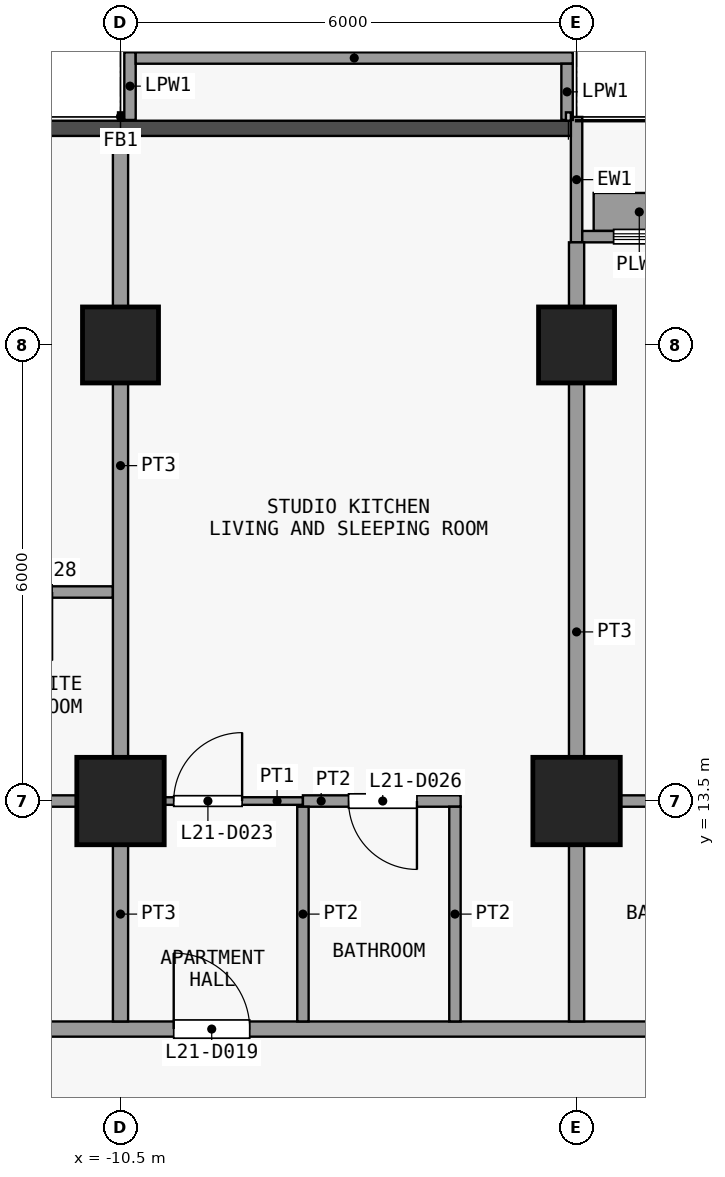
"""IFC4 building model, lengths in metres.
Left out: names, types, materials, properties, quantities, classifications, styles, units other than length and angle.
Written with IfcOpenShell. Run it as: python <this file> out.ifc"""

import sys

from ifc_helpers import new_model, si_unit, direction, frame, frame_2d, origin, origin_2d, place, context, subcontext, project, spatial, rectangle, extrude, element, fill, save


model = new_model("IFC4")
c1 = context("Model", 3, precision=1e-05, world=origin(), true_north=direction((0.0, 1.0)))
c2 = subcontext(c1, "Body", "Model", "MODEL_VIEW")
j1 = project(units=[si_unit("LENGTHUNIT", "METRE"), si_unit("PLANEANGLEUNIT", "RADIAN")], contexts=[c1])
p1 = place(None, origin())
s1 = spatial("IfcSite", under=j1, at=p1, CompositionType="ELEMENT")
p2 = place(p1, origin())
s2 = spatial("IfcBuilding", under=s1, at=p2, CompositionType="ELEMENT")
p3 = place(p2, frame((0.0, 0.0, 88.3)))
s3 = spatial("IfcBuildingStorey", under=s2, at=p3, CompositionType="ELEMENT", Elevation=88.3)
p4 = place(p3, frame((-10.5, 13.5, 0.0), z_axis=(0.0, 0.0, 1.0), x_axis=(1.0, 0.0, 0.0)))
e1 = element("IfcColumn", 1, at=p4, inside=s3, PredefinedType="COLUMN", context=c2, shape_type="SweptSolid", body=[
    extrude(rectangle(XDim=1.15, YDim=1.15, at=origin_2d()), origin(), (0.0, 0.0, 1.0), 3.6),
])
p5 = place(p3, frame((-10.5, 19.5, 0.0), z_axis=(0.0, 0.0, 1.0), x_axis=(1.0, 0.0, 0.0)))
e2 = element("IfcColumn", 2, at=p5, inside=s3, PredefinedType="COLUMN", context=c2, shape_type="SweptSolid", body=[
    extrude(rectangle(XDim=1.0, YDim=1.0, at=origin_2d()), origin(), (0.0, 0.0, 1.0), 3.6),
])
p6 = place(p3, frame((-4.5, 13.5, 0.0), z_axis=(0.0, 0.0, 1.0), x_axis=(1.0, 0.0, 0.0)))
e3 = element("IfcColumn", 3, at=p6, inside=s3, PredefinedType="COLUMN", context=c2, shape_type="SweptSolid", body=[
    extrude(rectangle(XDim=1.15, YDim=1.15, at=origin_2d()), origin(), (0.0, 0.0, 1.0), 3.6),
])
p7 = place(p3, frame((-4.5, 19.5, 0.0), z_axis=(0.0, 0.0, 1.0), x_axis=(1.0, 0.0, 0.0)))
e4 = element("IfcColumn", 4, at=p7, inside=s3, PredefinedType="COLUMN", context=c2, shape_type="SweptSolid", body=[
    extrude(rectangle(XDim=1.0, YDim=1.0, at=origin_2d()), origin(), (0.0, 0.0, 1.0), 3.6),
])
p8 = place(p3, frame((-4.5, 20.85, 0.0), z_axis=(0.0, 0.0, 1.0), x_axis=(0.0, 1.0, 0.0)))
e5 = element("IfcWall", 5, at=p8, inside=s3, PredefinedType="SOLIDWALL", context=c2, shape_type="SweptSolid", body=[
    extrude(rectangle(XDim=1.65, YDim=0.15, at=frame_2d((0.825, 0.0))), origin(), (0.0, 0.0, 1.0), 3.3),
])
p9 = place(p3, frame((-4.425, 20.925, 0.0), z_axis=(0.0, 0.0, 1.0), x_axis=(1.0, 0.0, 0.0)))
e6 = element("IfcWall", 6, at=p9, inside=s3, PredefinedType="SOLIDWALL", context=c2, shape_type="SweptSolid", body=[
    extrude(rectangle(XDim=8.85, YDim=0.15, at=frame_2d((4.425, 0.0))), origin(), (0.0, 0.0, 1.0), 3.3),
])
p10 = place(p9, frame((3.825, 0.0, 0.0)))
e7 = element("IfcOpeningElement", 7, at=p10, cuts=e6, PredefinedType="OPENING", context=c2, shape_type="SweptSolid", body=[
    extrude(rectangle(XDim=1.2, YDim=2.4, at=frame_2d((0.6, 1.2))), frame((0.0, 0.085, 0.0), z_axis=(0.0, -1.0, 0.0), x_axis=(1.0, 0.0, 0.0)), (0.0, 0.0, 1.0), 0.17),
])
p11 = place(p9, frame((0.413, 0.0, 0.9)))
e8 = element("IfcOpeningElement", 8, at=p11, cuts=e6, PredefinedType="OPENING", context=c2, shape_type="SweptSolid", body=[
    extrude(rectangle(XDim=3.0, YDim=2.1, at=frame_2d((1.5, 1.05))), frame((0.0, 0.085, 0.0), z_axis=(0.0, -1.0, 0.0), x_axis=(1.0, 0.0, 0.0)), (0.0, 0.0, 1.0), 0.17),
])
p12 = place(p9, frame((5.438, 0.0, 0.9)))
e9 = element("IfcOpeningElement", 9, at=p12, cuts=e6, PredefinedType="OPENING", context=c2, shape_type="SweptSolid", body=[
    extrude(rectangle(XDim=3.0, YDim=2.1, at=frame_2d((1.5, 1.05))), frame((0.0, 0.085, 0.0), z_axis=(0.0, -1.0, 0.0), x_axis=(1.0, 0.0, 0.0)), (0.0, 0.0, 1.0), 0.17),
])
p13 = place(p3, frame((-4.275, 21.25, 0.0), z_axis=(0.0, 0.0, 1.0), x_axis=(1.0, 0.0, 0.0)))
e10 = element("IfcWall", 10, at=p13, inside=s3, PredefinedType="USERDEFINED", context=c2, shape_type="SweptSolid", body=[
    extrude(rectangle(XDim=1.2, YDim=0.5, at=frame_2d((0.6, 0.0))), origin(), (0.0, 0.0, 1.0), 0.9),
])
p14 = place(p3, frame((-10.375, 22.46, 0.0), z_axis=(0.0, 0.0, 1.0), x_axis=(0.0, 1.0, 0.0)))
e11 = element("IfcWall", 11, at=p14, inside=s3, PredefinedType="PARAPET", context=c2, shape_type="SweptSolid", body=[
    extrude(rectangle(XDim=0.89, YDim=0.15, at=frame_2d((0.445, 0.0))), origin(), (0.0, 0.0, 1.0), 1.15),
])
p15 = place(p3, frame((-10.3, 23.275, 0.0), z_axis=(0.0, 0.0, 1.0), x_axis=(1.0, 0.0, 0.0)))
e12 = element("IfcWall", 12, at=p15, inside=s3, PredefinedType="PARAPET", context=c2, shape_type="SweptSolid", body=[
    extrude(rectangle(XDim=5.75, YDim=0.15, at=frame_2d((2.875, 0.0))), origin(), (0.0, 0.0, 1.0), 1.15),
])
p16 = place(p3, frame((-4.625, 23.2, 0.0), z_axis=(0.0, 0.0, 1.0), x_axis=(0.0, -1.0, 0.0)))
e13 = element("IfcWall", 13, at=p16, inside=s3, PredefinedType="PARAPET", context=c2, shape_type="SweptSolid", body=[
    extrude(rectangle(XDim=0.74, YDim=0.15, at=frame_2d((0.37, 0.0))), origin(), (0.0, 0.0, 1.0), 1.15),
])
p17 = place(p3, frame((-25.35, 10.5, 0.0), z_axis=(0.0, 0.0, 1.0), x_axis=(1.0, 0.0, 0.0)))
e14 = element("IfcWall", 14, at=p17, inside=s3, PredefinedType="PARTITIONING", context=c2, shape_type="SweptSolid", body=[
    extrude(rectangle(XDim=49.2, YDim=0.2, at=frame_2d((24.6, 0.0))), origin(), (0.0, 0.0, 1.0), 3.3),
])
p18 = place(p17, frame((7.05, 0.0, 0.0)))
e15 = element("IfcOpeningElement", 15, at=p18, cuts=e14, PredefinedType="OPENING", context=c2, shape_type="SweptSolid", body=[
    extrude(rectangle(XDim=1.0, YDim=2.1, at=frame_2d((0.5, 1.05))), frame((0.0, 0.11, 0.0), z_axis=(0.0, -1.0, 0.0), x_axis=(1.0, 0.0, 0.0)), (0.0, 0.0, 1.0), 0.22),
])
p19 = place(p17, frame((15.55, 0.0, 0.0)))
e16 = element("IfcOpeningElement", 16, at=p19, cuts=e14, PredefinedType="OPENING", context=c2, shape_type="SweptSolid", body=[
    extrude(rectangle(XDim=1.0, YDim=2.1, at=frame_2d((0.5, 1.05))), frame((0.0, 0.11, 0.0), z_axis=(0.0, -1.0, 0.0), x_axis=(1.0, 0.0, 0.0)), (0.0, 0.0, 1.0), 0.22),
])
p20 = place(p17, frame((24.05, 0.0, 0.0)))
e17 = element("IfcOpeningElement", 17, at=p20, cuts=e14, PredefinedType="OPENING", context=c2, shape_type="SweptSolid", body=[
    extrude(rectangle(XDim=1.0, YDim=2.1, at=frame_2d((0.5, 1.05))), frame((0.0, 0.11, 0.0), z_axis=(0.0, -1.0, 0.0), x_axis=(1.0, 0.0, 0.0)), (0.0, 0.0, 1.0), 0.22),
])
p21 = place(p17, frame((45.05, 0.0, 0.0)))
e18 = element("IfcOpeningElement", 18, at=p21, cuts=e14, PredefinedType="OPENING", context=c2, shape_type="SweptSolid", body=[
    extrude(rectangle(XDim=1.0, YDim=2.1, at=frame_2d((0.5, 1.05))), frame((0.0, 0.11, 0.0), z_axis=(0.0, -1.0, 0.0), x_axis=(1.0, 0.0, 0.0)), (0.0, 0.0, 1.0), 0.22),
])
p22 = place(p3, frame((-10.5, 13.5, 0.0), z_axis=(0.0, 0.0, 1.0), x_axis=(1.0, 0.0, 0.0)))
e19 = element("IfcWall", 19, at=p22, inside=s3, PredefinedType="PARTITIONING", context=c2, shape_type="SweptSolid", body=[
    extrude(rectangle(XDim=2.4, YDim=0.1, at=frame_2d((1.2, 0.0))), origin(), (0.0, 0.0, 1.0), 3.3),
])
p23 = place(p22, frame((0.7, 0.0, 0.0)))
e20 = element("IfcOpeningElement", 20, at=p23, cuts=e19, PredefinedType="OPENING", context=c2, shape_type="SweptSolid", body=[
    extrude(rectangle(XDim=0.9, YDim=2.1, at=frame_2d((0.45, 1.05))), frame((0.0, 0.06, 0.0), z_axis=(0.0, -1.0, 0.0), x_axis=(1.0, 0.0, 0.0)), (0.0, 0.0, 1.0), 0.12),
])
p24 = place(p3, frame((-16.5, 13.5, 0.0), z_axis=(0.0, 0.0, 1.0), x_axis=(1.0, 0.0, 0.0)))
e21 = element("IfcWall", 21, at=p24, inside=s3, PredefinedType="PARTITIONING", context=c2, shape_type="SweptSolid", body=[
    extrude(rectangle(XDim=6.0, YDim=0.15, at=frame_2d((3.0, 0.0))), origin(), (0.0, 0.0, 1.0), 3.3),
])
p25 = place(p3, frame((-8.1, 13.5, 0.0), z_axis=(0.0, 0.0, 1.0), x_axis=(1.0, 0.0, 0.0)))
e22 = element("IfcWall", 22, at=p25, inside=s3, PredefinedType="PARTITIONING", context=c2, shape_type="SweptSolid", body=[
    extrude(rectangle(XDim=2.075, YDim=0.15, at=frame_2d((1.038, 0.0))), origin(), (0.0, 0.0, 1.0), 3.3),
])
p26 = place(p25, frame((0.6, 0.0, 0.0)))
e23 = element("IfcOpeningElement", 23, at=p26, cuts=e22, PredefinedType="OPENING", context=c2, shape_type="SweptSolid", body=[
    extrude(rectangle(XDim=0.9, YDim=2.1, at=frame_2d((0.45, 1.05))), frame((0.0, 0.085, 0.0), z_axis=(0.0, -1.0, 0.0), x_axis=(1.0, 0.0, 0.0)), (0.0, 0.0, 1.0), 0.17),
])
p27 = place(p3, frame((-4.4, 13.5, 0.0), z_axis=(0.0, 0.0, 1.0), x_axis=(1.0, 0.0, 0.0)))
e24 = element("IfcWall", 24, at=p27, inside=s3, PredefinedType="PARTITIONING", context=c2, shape_type="SweptSolid", body=[
    extrude(rectangle(XDim=2.4, YDim=0.15, at=frame_2d((1.2, 0.0))), origin(), (0.0, 0.0, 1.0), 3.3),
])
p28 = place(p3, frame((-13.2, 16.25, 0.0), z_axis=(0.0, 0.0, 1.0), x_axis=(1.0, 0.0, 0.0)))
e25 = element("IfcWall", 25, at=p28, inside=s3, PredefinedType="PARTITIONING", context=c2, shape_type="SweptSolid", body=[
    extrude(rectangle(XDim=2.6, YDim=0.15, at=frame_2d((1.3, 0.0))), origin(), (0.0, 0.0, 1.0), 3.3),
])
p29 = place(p28, frame((0.9, 0.0, 0.0)))
e26 = element("IfcOpeningElement", 26, at=p29, cuts=e25, PredefinedType="OPENING", context=c2, shape_type="SweptSolid", body=[
    extrude(rectangle(XDim=0.9, YDim=2.1, at=frame_2d((0.45, 1.05))), frame((0.0, 0.085, 0.0), z_axis=(0.0, -1.0, 0.0), x_axis=(1.0, 0.0, 0.0)), (0.0, 0.0, 1.0), 0.17),
])
p30 = place(p3, frame((-10.5, 10.6, 0.0), z_axis=(0.0, 0.0, 1.0), x_axis=(0.0, 1.0, 0.0)))
e27 = element("IfcWall", 27, at=p30, inside=s3, PredefinedType="PARTITIONING", context=c2, shape_type="SweptSolid", body=[
    extrude(rectangle(XDim=2.825, YDim=0.2, at=frame_2d((1.413, 0.0))), origin(), (0.0, 0.0, 1.0), 3.3),
])
p31 = place(p3, frame((-10.5, 13.575, 0.0), z_axis=(0.0, 0.0, 1.0), x_axis=(0.0, 1.0, 0.0)))
e28 = element("IfcWall", 28, at=p31, inside=s3, PredefinedType="PARTITIONING", context=c2, shape_type="SweptSolid", body=[
    extrude(rectangle(XDim=8.675, YDim=0.2, at=frame_2d((4.337, 0.0))), origin(), (0.0, 0.0, 1.0), 3.3),
])
for number, where, z_axis, x_axis in (
    (29, (-8.1, 10.6, 0.0), (0.0, 0.0, 1.0), (0.0, 1.0, 0.0)),
    (30, (-6.1, 10.6, 0.0), (0.0, 0.0, 1.0), (0.0, 1.0, 0.0)),
):
    element("IfcWall", number, at=place(p3, frame(where, z_axis=z_axis, x_axis=x_axis)), inside=s3, PredefinedType="PARTITIONING", context=c2, shape_type="SweptSolid", body=[
        extrude(rectangle(XDim=2.825, YDim=0.15, at=frame_2d((1.413, 0.0))), origin(), (0.0, 0.0, 1.0), 3.3),
    ])
p32 = place(p3, frame((-4.5, 10.6, 0.0), z_axis=(0.0, 0.0, 1.0), x_axis=(0.0, 1.0, 0.0)))
e31 = element("IfcWall", 31, at=p32, inside=s3, PredefinedType="PARTITIONING", context=c2, shape_type="SweptSolid", body=[
    extrude(rectangle(XDim=10.25, YDim=0.2, at=frame_2d((5.125, 0.0))), origin(), (0.0, 0.0, 1.0), 3.3),
])
p33 = place(p11, origin())
e32 = element("IfcWindow", 32, at=p33, inside=s3, PartitioningType="SINGLE_PANEL", PredefinedType="WINDOW", context=c2, shape_type="SweptSolid", body=[
    extrude(rectangle(XDim=3.0, YDim=2.1, at=frame_2d((1.5, 1.05))), frame((0.0, 0.03, 0.0), z_axis=(0.0, -1.0, 0.0), x_axis=(1.0, 0.0, 0.0)), (0.0, 0.0, 1.0), 0.06),
])
fill(e8, e32)
p34 = place(p19, origin())
e33 = element("IfcDoor", 33, at=p34, inside=s3, OperationType="SINGLE_SWING_RIGHT", PredefinedType="DOOR", context=c2, shape_type="SweptSolid", body=[
    extrude(rectangle(XDim=1.0, YDim=2.1, at=frame_2d((0.5, 1.05))), frame((0.0, 0.025, 0.0), z_axis=(0.0, -1.0, 0.0), x_axis=(1.0, 0.0, 0.0)), (0.0, 0.0, 1.0), 0.05),
])
fill(e16, e33)
p35 = place(p23, origin())
e34 = element("IfcDoor", 34, at=p35, inside=s3, OperationType="SINGLE_SWING_LEFT", PredefinedType="DOOR", context=c2, shape_type="SweptSolid", body=[
    extrude(rectangle(XDim=0.9, YDim=2.1, at=frame_2d((0.45, 1.05))), frame((0.0, 0.025, 0.0), z_axis=(0.0, -1.0, 0.0), x_axis=(1.0, 0.0, 0.0)), (0.0, 0.0, 1.0), 0.05),
])
fill(e20, e34)
p36 = place(p26, origin())
e35 = element("IfcDoor", 35, at=p36, inside=s3, OperationType="SINGLE_SWING_RIGHT", PredefinedType="DOOR", context=c2, shape_type="SweptSolid", body=[
    extrude(rectangle(XDim=0.9, YDim=2.1, at=frame_2d((0.45, 1.05))), frame((0.0, 0.025, 0.0), z_axis=(0.0, -1.0, 0.0), x_axis=(1.0, 0.0, 0.0)), (0.0, 0.0, 1.0), 0.05),
])
fill(e23, e35)
save(model, sys.argv[1])
